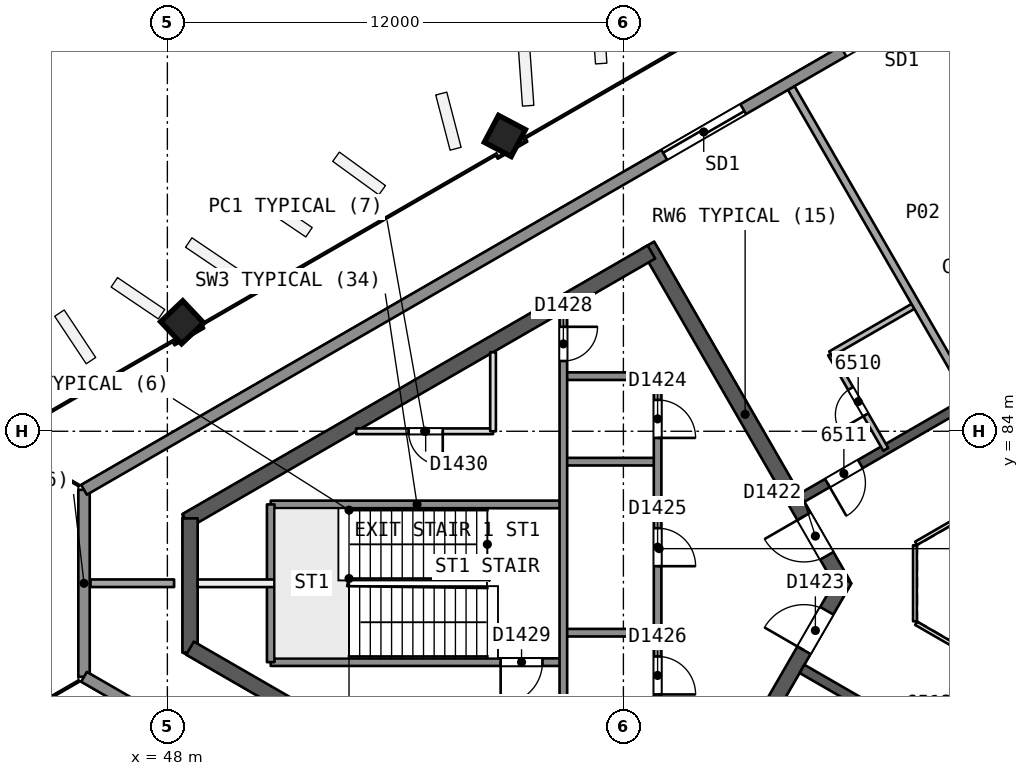
"""IFC4 building model, lengths in metres.
Left out: names, types, materials, properties, quantities, classifications, styles, units other than length and angle.
Written with IfcOpenShell. Run it as: python <this file> out.ifc"""

import sys

from ifc_helpers import new_model, si_unit, direction, frame, frame_2d, origin, origin_2d, place, context, subcontext, project, spatial, rectangle, extrude, element, fill, save


model = new_model("IFC4")
c1 = context("Model", 3, precision=1e-05, world=origin(), true_north=direction((0.0, 1.0)))
c2 = subcontext(c1, "Body", "Model", "MODEL_VIEW")
j1 = project(units=[si_unit("LENGTHUNIT", "METRE"), si_unit("PLANEANGLEUNIT", "RADIAN")], contexts=[c1])
p1 = place(None, origin())
s1 = spatial("IfcSite", under=j1, at=p1, CompositionType="ELEMENT")
p2 = place(p1, origin())
s2 = spatial("IfcBuilding", under=s1, at=p2, CompositionType="ELEMENT")
p3 = place(p2, frame((0.0, 0.0, 266.4)))
s3 = spatial("IfcBuildingStorey", under=s2, at=p3, CompositionType="ELEMENT", Elevation=266.4)
p4 = place(p3, frame((65.769, 80.0, 0.0), z_axis=(0.0, 0.0, 1.0), x_axis=(-0.50000177223, 0.866024380585, 0.0)))
e1 = element("IfcWall", 1, at=p4, inside=s3, PredefinedType="SHEAR", context=c2, shape_type="SweptSolid", body=[
    extrude(rectangle(XDim=10.265, YDim=0.4, at=frame_2d((5.132, 0.0))), origin(), (0.0, 0.0, 1.0), 3.7),
])
p5 = place(p4, frame((0.834, 0.0, 0.0)))
e2 = element("IfcOpeningElement", 2, at=p5, cuts=e1, PredefinedType="OPENING", context=c2, shape_type="SweptSolid", body=[
    extrude(rectangle(XDim=1.2, YDim=2.1, at=frame_2d((0.6, 1.05))), frame((0.0, 0.21, 0.0), z_axis=(0.0, -1.0, 0.0), x_axis=(1.0, 0.0, 0.0)), (0.0, 0.0, 1.0), 0.421),
])
p6 = place(p3, frame((60.737, 88.716, 0.0), z_axis=(0.0, 0.0, 1.0), x_axis=(-0.866028812667, -0.499994095595, 0.0)))
e3 = element("IfcWall", 3, at=p6, inside=s3, PredefinedType="SHEAR", context=c2, shape_type="SweptSolid", body=[
    extrude(rectangle(XDim=14.134, YDim=0.4, at=frame_2d((7.067, 0.0))), origin(), (0.0, 0.0, 1.0), 3.7),
])
p7 = place(p3, frame((48.597, 81.707, 0.0), z_axis=(0.0, 0.0, 1.0), x_axis=(0.0, -1.0, 0.0)))
e4 = element("IfcWall", 4, at=p7, inside=s3, PredefinedType="SHEAR", context=c2, shape_type="SweptSolid", body=[
    extrude(rectangle(XDim=3.53, YDim=0.4, at=frame_2d((1.765, 0.0))), origin(), (0.0, 0.0, 1.0), 3.7),
])
p8 = place(p3, frame((48.597, 78.293, 0.0), z_axis=(0.0, 0.0, 1.0), x_axis=(0.866026024469, -0.499998924941, 0.0)))
e5 = element("IfcWall", 5, at=p8, inside=s3, PredefinedType="SHEAR", context=c2, shape_type="SweptSolid", body=[
    extrude(rectangle(XDim=14.218, YDim=0.4, at=frame_2d((7.109, 0.0))), origin(), (0.0, 0.0, 1.0), 3.7),
])
p9 = place(p3, frame((60.737, 71.284, 0.0), z_axis=(0.0, 0.0, 1.0), x_axis=(0.50000547566, 0.866022242388, 0.0)))
e6 = element("IfcWall", 6, at=p9, inside=s3, PredefinedType="SHEAR", context=c2, shape_type="SweptSolid", body=[
    extrude(rectangle(XDim=10.18, YDim=0.4, at=frame_2d((5.09, 0.0))), origin(), (0.0, 0.0, 1.0), 3.7),
])
p10 = place(p9, frame((8.03, 0.0, 0.0)))
e7 = element("IfcOpeningElement", 7, at=p10, cuts=e6, PredefinedType="OPENING", context=c2, shape_type="SweptSolid", body=[
    extrude(rectangle(XDim=1.2, YDim=2.1, at=frame_2d((0.6, 1.05))), frame((0.0, 0.21, 0.0), z_axis=(0.0, -1.0, 0.0), x_axis=(1.0, 0.0, 0.0)), (0.0, 0.0, 1.0), 0.421),
])
p11 = place(p3, frame((78.2, 90.046, 0.0), z_axis=(0.0, 0.0, 1.0), x_axis=(-0.866026492143, -0.499998114903, 0.0)))
e8 = element("IfcWall", 8, at=p11, inside=s3, PredefinedType="SHEAR", context=c2, shape_type="SweptSolid", body=[
    extrude(rectangle(XDim=15.588, YDim=0.25, at=frame_2d((7.794, 0.0))), origin(), (0.0, 0.0, 1.0), 3.3),
])
p12 = place(p11, frame((7.072, 0.0, 0.0)))
e9 = element("IfcOpeningElement", 9, at=p12, cuts=e8, PredefinedType="OPENING", context=c2, shape_type="SweptSolid", body=[
    extrude(rectangle(XDim=1.0, YDim=2.1, at=frame_2d((0.5, 1.05))), frame((0.0, 0.135, 0.0), z_axis=(0.0, -1.0, 0.0), x_axis=(1.0, 0.0, 0.0)), (0.0, 0.0, 1.0), 0.271),
])
p13 = place(p11, frame((13.816, 0.0, 0.0)))
e10 = element("IfcOpeningElement", 10, at=p13, cuts=e8, PredefinedType="OPENING", context=c2, shape_type="SweptSolid", body=[
    extrude(rectangle(XDim=1.0, YDim=2.1, at=frame_2d((0.5, 1.05))), frame((0.0, 0.135, 0.0), z_axis=(0.0, -1.0, 0.0), x_axis=(1.0, 0.0, 0.0)), (0.0, 0.0, 1.0), 0.271),
])
p14 = place(p3, frame((64.7, 77.748, 0.0), z_axis=(0.0, 0.0, 1.0), x_axis=(0.866026492143, -0.499998114903, 0.0)))
e11 = element("IfcWall", 11, at=p14, inside=s3, PredefinedType="SHEAR", context=c2, shape_type="SweptSolid", body=[
    extrude(rectangle(XDim=15.588, YDim=0.25, at=frame_2d((7.794, 0.0))), origin(), (0.0, 0.0, 1.0), 3.3),
])
p15 = place(p14, frame((3.372, 0.0, 0.0)))
e12 = element("IfcOpeningElement", 12, at=p15, cuts=e11, PredefinedType="OPENING", context=c2, shape_type="SweptSolid", body=[
    extrude(rectangle(XDim=1.0, YDim=2.1, at=frame_2d((0.5, 1.05))), frame((0.0, 0.135, 0.0), z_axis=(0.0, -1.0, 0.0), x_axis=(1.0, 0.0, 0.0)), (0.0, 0.0, 1.0), 0.271),
])
p16 = place(p14, frame((12.216, 0.0, 0.0)))
e13 = element("IfcOpeningElement", 13, at=p16, cuts=e11, PredefinedType="OPENING", context=c2, shape_type="SweptSolid", body=[
    extrude(rectangle(XDim=1.0, YDim=2.1, at=frame_2d((0.5, 1.05))), frame((0.0, 0.135, 0.0), z_axis=(0.0, -1.0, 0.0), x_axis=(1.0, 0.0, 0.0)), (0.0, 0.0, 1.0), 0.271),
])
p17 = place(p3, frame((56.858, 91.785, 0.0), z_axis=(0.019327242333, -0.012137244332, 0.999739538582), x_axis=(-0.500208874039, 0.865669601935, 0.020179757644)))
e14 = element("IfcColumn", 14, at=p17, inside=s3, PredefinedType="COLUMN", context=c2, shape_type="SweptSolid", body=[
    extrude(rectangle(XDim=0.8, YDim=0.8, at=origin_2d()), origin(), (0.0, 0.0, 1.0), 3.701),
])
p18 = place(p3, frame((48.354, 86.876, 0.0), z_axis=(0.028557232129, -0.006793059837, 0.999569076568), x_axis=(-0.500407681469, 0.865554719029, 0.0201787188)))
e15 = element("IfcColumn", 15, at=p18, inside=s3, PredefinedType="COLUMN", context=c2, shape_type="SweptSolid", body=[
    extrude(rectangle(XDim=0.8, YDim=0.8, at=origin_2d()), origin(), (0.0, 0.0, 1.0), 3.702),
])
p19 = place(p3, frame((64.416, 93.032, 0.0), z_axis=(0.0, 0.0, 1.0), x_axis=(0.500006360488, -0.866021731524, 0.0)))
e16 = element("IfcWall", 16, at=p19, inside=s3, PredefinedType="PARTITIONING", context=c2, shape_type="SweptSolid", body=[
    extrude(rectangle(XDim=9.479, YDim=0.2, at=frame_2d((4.739, 0.0))), origin(), (0.0, 0.0, 1.0), 3.3),
])
p20 = place(p3, frame((66.903, 83.524, 0.0), z_axis=(0.0, 0.0, 1.0), x_axis=(-0.499987231761, 0.866032775405, 0.0)))
e17 = element("IfcWall", 17, at=p20, inside=s3, PredefinedType="PARTITIONING", context=c2, shape_type="SweptSolid", body=[
    extrude(rectangle(XDim=2.9, YDim=0.15, at=frame_2d((1.45, 0.0))), origin(), (0.0, 0.0, 1.0), 3.3),
])
p21 = place(p20, frame((1.05, 0.0, 0.0)))
e18 = element("IfcOpeningElement", 18, at=p21, cuts=e17, PredefinedType="OPENING", context=c2, shape_type="SweptSolid", body=[
    extrude(rectangle(XDim=0.8, YDim=2.1, at=frame_2d((0.4, 1.05))), frame((0.0, 0.085, 0.0), z_axis=(0.0, -1.0, 0.0), x_axis=(1.0, 0.0, 0.0)), (0.0, 0.0, 1.0), 0.171),
])
p22 = place(p3, frame((65.453, 86.035, 0.0), z_axis=(0.0, 0.0, 1.0), x_axis=(0.866021400173, 0.500006934395, 0.0)))
e19 = element("IfcWall", 19, at=p22, inside=s3, PredefinedType="PARTITIONING", context=c2, shape_type="SweptSolid", body=[
    extrude(rectangle(XDim=2.6, YDim=0.15, at=frame_2d((1.3, 0.0))), origin(), (0.0, 0.0, 1.0), 3.3),
])
p23 = place(p3, frame((45.977, 80.001, 0.0), z_axis=(0.0, 0.0, 1.0), x_axis=(1.0, 0.0, 0.0)))
e20 = element("IfcWall", 20, at=p23, inside=s3, PredefinedType="PARTITIONING", context=c2, shape_type="SweptSolid", body=[
    extrude(rectangle(XDim=2.2, YDim=0.2, at=frame_2d((1.1, 0.0))), origin(), (0.0, 0.0, 1.0), 3.3),
])
p24 = place(p3, frame((45.807, 77.54, 0.0), z_axis=(0.0, 0.0, 1.0), x_axis=(0.0, 1.0, 0.0)))
e21 = element("IfcWall", 21, at=p24, inside=s3, PredefinedType="SOLIDWALL", context=c2, shape_type="SweptSolid", body=[
    extrude(rectangle(XDim=4.92, YDim=0.3, at=frame_2d((2.46, 0.0))), origin(), (0.0, 0.0, 1.0), 3.3),
])
p25 = place(p3, frame((45.807, 82.46, 0.0), z_axis=(0.0, 0.0, 1.0), x_axis=(0.866024833565, 0.500000987648, 0.0)))
e22 = element("IfcWall", 22, at=p25, inside=s3, PredefinedType="SOLIDWALL", context=c2, shape_type="SweptSolid", body=[
    extrude(rectangle(XDim=48.104, YDim=0.3, at=frame_2d((24.052, 0.0))), origin(), (0.0, 0.0, 1.0), 3.3),
])
p26 = place(p25, frame((28.296, 0.0, 0.0)))
e23 = element("IfcOpeningElement", 23, at=p26, cuts=e22, PredefinedType="OPENING", context=c2, shape_type="SweptSolid", body=[
    extrude(rectangle(XDim=2.4, YDim=2.4, at=frame_2d((1.2, 1.2))), frame((0.0, 0.161, 0.0), z_axis=(0.0, -1.0, 0.0), x_axis=(1.0, 0.0, 0.0)), (0.0, 0.0, 1.0), 0.321),
])
p27 = place(p25, frame((23.074, 0.0, 0.0)))
e24 = element("IfcOpeningElement", 24, at=p27, cuts=e22, PredefinedType="OPENING", context=c2, shape_type="SweptSolid", body=[
    extrude(rectangle(XDim=2.4, YDim=2.4, at=frame_2d((1.2, 1.2))), frame((0.0, 0.161, 0.0), z_axis=(0.0, -1.0, 0.0), x_axis=(1.0, 0.0, 0.0)), (0.0, 0.0, 1.0), 0.321),
])
p28 = place(p25, frame((17.63, 0.0, 0.0)))
e25 = element("IfcOpeningElement", 25, at=p28, cuts=e22, PredefinedType="OPENING", context=c2, shape_type="SweptSolid", body=[
    extrude(rectangle(XDim=2.4, YDim=2.4, at=frame_2d((1.2, 1.2))), frame((0.0, 0.161, 0.0), z_axis=(0.0, -1.0, 0.0), x_axis=(1.0, 0.0, 0.0)), (0.0, 0.0, 1.0), 0.321),
])
p29 = place(p25, frame((39.118, 0.0, 0.9)))
e26 = element("IfcOpeningElement", 26, at=p29, cuts=e22, PredefinedType="OPENING", context=c2, shape_type="SweptSolid", body=[
    extrude(rectangle(XDim=1.8, YDim=1.5, at=frame_2d((0.9, 0.75))), frame((0.0, 0.161, 0.0), z_axis=(0.0, -1.0, 0.0), x_axis=(1.0, 0.0, 0.0)), (0.0, 0.0, 1.0), 0.321),
])
p30 = place(p3, frame((87.466, 53.488, 0.0), z_axis=(0.0, 0.0, 1.0), x_axis=(-0.866024833565, 0.500000987648, 0.0)))
e27 = element("IfcWall", 27, at=p30, inside=s3, PredefinedType="SOLIDWALL", context=c2, shape_type="SweptSolid", body=[
    extrude(rectangle(XDim=48.104, YDim=0.3, at=frame_2d((24.052, 0.0))), origin(), (0.0, 0.0, 1.0), 3.3),
])
p31 = place(p30, frame((23.152, 0.0, 0.0)))
e28 = element("IfcOpeningElement", 28, at=p31, cuts=e27, PredefinedType="OPENING", context=c2, shape_type="SweptSolid", body=[
    extrude(rectangle(XDim=2.4, YDim=2.4, at=frame_2d((1.2, 1.2))), frame((0.0, 0.161, 0.0), z_axis=(0.0, -1.0, 0.0), x_axis=(1.0, 0.0, 0.0)), (0.0, 0.0, 1.0), 0.321),
])
p32 = place(p30, frame((17.93, 0.0, 0.0)))
e29 = element("IfcOpeningElement", 29, at=p32, cuts=e27, PredefinedType="OPENING", context=c2, shape_type="SweptSolid", body=[
    extrude(rectangle(XDim=2.4, YDim=2.4, at=frame_2d((1.2, 1.2))), frame((0.0, 0.161, 0.0), z_axis=(0.0, -1.0, 0.0), x_axis=(1.0, 0.0, 0.0)), (0.0, 0.0, 1.0), 0.321),
])
p33 = place(p30, frame((28.074, 0.0, 0.0)))
e30 = element("IfcOpeningElement", 30, at=p33, cuts=e27, PredefinedType="OPENING", context=c2, shape_type="SweptSolid", body=[
    extrude(rectangle(XDim=2.4, YDim=2.4, at=frame_2d((1.2, 1.2))), frame((0.0, 0.161, 0.0), z_axis=(0.0, -1.0, 0.0), x_axis=(1.0, 0.0, 0.0)), (0.0, 0.0, 1.0), 0.321),
])
p34 = place(p3, frame((60.9, 85.45, 0.0), z_axis=(0.0, 0.0, 1.0), x_axis=(-1.0, 0.0, 0.0)))
e31 = element("IfcWall", 31, at=p34, inside=s3, PredefinedType="SOLIDWALL", context=c2, shape_type="SweptSolid", body=[
    extrude(rectangle(XDim=2.48, YDim=0.2, at=frame_2d((1.24, 0.0))), origin(), (0.0, 0.0, 1.0), 3.3),
])
p35 = place(p3, frame((56.57, 84.0, 0.0), z_axis=(0.0, 0.0, 1.0), x_axis=(-1.0, 0.0, 0.0)))
e32 = element("IfcWall", 32, at=p35, inside=s3, PredefinedType="PARTITIONING", context=c2, shape_type="SweptSolid", body=[
    extrude(rectangle(XDim=3.602, YDim=0.15, at=frame_2d((1.801, 0.0))), origin(), (0.0, 0.0, 1.0), 3.3),
])
p36 = place(p35, frame((1.323, 0.0, 0.0)))
e33 = element("IfcOpeningElement", 33, at=p36, cuts=e32, PredefinedType="OPENING", context=c2, shape_type="SweptSolid", body=[
    extrude(rectangle(XDim=0.9, YDim=2.1, at=frame_2d((0.45, 1.05))), frame((0.0, 0.085, 0.0), z_axis=(0.0, -1.0, 0.0), x_axis=(1.0, 0.0, 0.0)), (0.0, 0.0, 1.0), 0.171),
])
p37 = place(p3, frame((60.9, 83.2, 0.0), z_axis=(0.0, 0.0, 1.0), x_axis=(-1.0, 0.0, 0.0)))
e34 = element("IfcWall", 34, at=p37, inside=s3, PredefinedType="SOLIDWALL", context=c2, shape_type="SweptSolid", body=[
    extrude(rectangle(XDim=2.48, YDim=0.2, at=frame_2d((1.24, 0.0))), origin(), (0.0, 0.0, 1.0), 3.3),
])
p38 = place(p3, frame((58.42, 82.075, 0.0), z_axis=(0.0, 0.0, 1.0), x_axis=(-1.0, 0.0, 0.0)))
e35 = element("IfcWall", 35, at=p38, inside=s3, PredefinedType="SOLIDWALL", context=c2, shape_type="SweptSolid", body=[
    extrude(rectangle(XDim=7.7, YDim=0.2, at=frame_2d((3.85, 0.0))), origin(), (0.0, 0.0, 1.0), 3.3),
])
p39 = place(p3, frame((50.82, 80.0, 0.0), z_axis=(0.0, 0.0, 1.0), x_axis=(-1.0, 0.0, 0.0)))
e36 = element("IfcWall", 36, at=p39, inside=s3, PredefinedType="PARTITIONING", context=c2, shape_type="SweptSolid", body=[
    extrude(rectangle(XDim=2.023, YDim=0.2, at=frame_2d((1.012, 0.0))), origin(), (0.0, 0.0, 1.0), 3.3),
])
p40 = place(p3, frame((60.9, 78.7, 0.0), z_axis=(0.0, 0.0, 1.0), x_axis=(-1.0, 0.0, 0.0)))
e37 = element("IfcWall", 37, at=p40, inside=s3, PredefinedType="SOLIDWALL", context=c2, shape_type="SweptSolid", body=[
    extrude(rectangle(XDim=2.48, YDim=0.2, at=frame_2d((1.24, 0.0))), origin(), (0.0, 0.0, 1.0), 3.3),
])
p41 = place(p3, frame((58.42, 77.925, 0.0), z_axis=(0.0, 0.0, 1.0), x_axis=(-1.0, 0.0, 0.0)))
e38 = element("IfcWall", 38, at=p41, inside=s3, PredefinedType="SOLIDWALL", context=c2, shape_type="SweptSolid", body=[
    extrude(rectangle(XDim=7.7, YDim=0.2, at=frame_2d((3.85, 0.0))), origin(), (0.0, 0.0, 1.0), 3.3),
])
p42 = place(p41, frame((0.55, 0.0, 0.0)))
e39 = element("IfcOpeningElement", 39, at=p42, cuts=e38, PredefinedType="OPENING", context=c2, shape_type="SweptSolid", body=[
    extrude(rectangle(XDim=1.1, YDim=2.1, at=frame_2d((0.55, 1.05))), frame((0.0, 0.11, 0.0), z_axis=(0.0, -1.0, 0.0), x_axis=(1.0, 0.0, 0.0)), (0.0, 0.0, 1.0), 0.221),
])
p43 = place(p3, frame((60.9, 85.45, 0.0), z_axis=(0.0, 0.0, 1.0), x_axis=(0.0, -1.0, 0.0)))
e40 = element("IfcWall", 40, at=p43, inside=s3, PredefinedType="SOLIDWALL", context=c2, shape_type="SweptSolid", body=[
    extrude(rectangle(XDim=10.9, YDim=0.2, at=frame_2d((5.45, 0.0))), origin(), (0.0, 0.0, 1.0), 3.3),
])
p44 = place(p43, frame((0.625, 0.0, 0.0)))
e41 = element("IfcOpeningElement", 41, at=p44, cuts=e40, PredefinedType="OPENING", context=c2, shape_type="SweptSolid", body=[
    extrude(rectangle(XDim=1.0, YDim=2.1, at=frame_2d((0.5, 1.05))), frame((0.0, 0.11, 0.0), z_axis=(0.0, -1.0, 0.0), x_axis=(1.0, 0.0, 0.0)), (0.0, 0.0, 1.0), 0.221),
])
p45 = place(p43, frame((4.0, 0.0, 0.0)))
e42 = element("IfcOpeningElement", 42, at=p45, cuts=e40, PredefinedType="OPENING", context=c2, shape_type="SweptSolid", body=[
    extrude(rectangle(XDim=1.0, YDim=2.1, at=frame_2d((0.5, 1.05))), frame((0.0, 0.11, 0.0), z_axis=(0.0, -1.0, 0.0), x_axis=(1.0, 0.0, 0.0)), (0.0, 0.0, 1.0), 0.221),
])
p46 = place(p43, frame((7.375, 0.0, 0.0)))
e43 = element("IfcOpeningElement", 43, at=p46, cuts=e40, PredefinedType="OPENING", context=c2, shape_type="SweptSolid", body=[
    extrude(rectangle(XDim=1.0, YDim=2.1, at=frame_2d((0.5, 1.05))), frame((0.0, 0.11, 0.0), z_axis=(0.0, -1.0, 0.0), x_axis=(1.0, 0.0, 0.0)), (0.0, 0.0, 1.0), 0.221),
])
p47 = place(p3, frame((58.42, 87.148, 0.0), z_axis=(0.0, 0.0, 1.0), x_axis=(0.0, -1.0, 0.0)))
e44 = element("IfcWall", 44, at=p47, inside=s3, PredefinedType="SOLIDWALL", context=c2, shape_type="SweptSolid", body=[
    extrude(rectangle(XDim=10.698, YDim=0.2, at=frame_2d((5.349, 0.0))), origin(), (0.0, 0.0, 1.0), 3.3),
])
p48 = place(p47, frame((0.399, 0.0, 0.0)))
e45 = element("IfcOpeningElement", 45, at=p48, cuts=e44, PredefinedType="OPENING", context=c2, shape_type="SweptSolid", body=[
    extrude(rectangle(XDim=0.9, YDim=2.1, at=frame_2d((0.45, 1.05))), frame((0.0, 0.11, 0.0), z_axis=(0.0, -1.0, 0.0), x_axis=(1.0, 0.0, 0.0)), (0.0, 0.0, 1.0), 0.221),
])
p49 = place(p3, frame((56.57, 86.08, 0.0), z_axis=(0.0, 0.0, 1.0), x_axis=(0.0, -1.0, 0.0)))
e46 = element("IfcWall", 46, at=p49, inside=s3, PredefinedType="PARTITIONING", context=c2, shape_type="SweptSolid", body=[
    extrude(rectangle(XDim=2.08, YDim=0.15, at=frame_2d((1.04, 0.0))), origin(), (0.0, 0.0, 1.0), 3.3),
])
p50 = place(p3, frame((50.72, 82.075, 0.0), z_axis=(0.0, 0.0, 1.0), x_axis=(0.0, -1.0, 0.0)))
e47 = element("IfcWall", 47, at=p50, inside=s3, PredefinedType="SOLIDWALL", context=c2, shape_type="SweptSolid", body=[
    extrude(rectangle(XDim=4.15, YDim=0.2, at=frame_2d((2.075, 0.0))), origin(), (0.0, 0.0, 1.0), 3.3),
])
p51 = place(p3, frame((77.738, 86.846, 0.0), z_axis=(0.0, 0.0, 1.0), x_axis=(-0.866026658274, -0.499997827154, 0.0)))
e48 = element("IfcWall", 48, at=p51, inside=s3, PredefinedType="PARTITIONING", context=c2, shape_type="SweptSolid", body=[
    extrude(rectangle(XDim=11.588, YDim=0.1, at=frame_2d((5.794, 0.0))), origin(), (0.0, 0.0, 1.0), 3.3),
])
p52 = place(p3, frame((67.672, 81.0, 0.0), z_axis=(0.0, 0.0, 1.0), x_axis=(0.0, -1.0, 0.0)))
e49 = element("IfcWall", 49, at=p52, inside=s3, PredefinedType="PARTITIONING", context=c2, shape_type="SweptSolid", body=[
    extrude(rectangle(XDim=2.0, YDim=0.1, at=frame_2d((1.0, 0.0))), origin(), (0.0, 0.0, 1.0), 3.3),
])
p53 = place(p3, frame((67.702, 78.948, 0.0), z_axis=(0.0, 0.0, 1.0), x_axis=(0.866026658274, -0.499997827154, 0.0)))
e50 = element("IfcWall", 50, at=p53, inside=s3, PredefinedType="PARTITIONING", context=c2, shape_type="SweptSolid", body=[
    extrude(rectangle(XDim=11.588, YDim=0.1, at=frame_2d((5.794, 0.0))), origin(), (0.0, 0.0, 1.0), 3.3),
])
p54 = place(p21, origin())
e51 = element("IfcDoor", 51, at=p54, inside=s3, OperationType="SINGLE_SWING_LEFT", PredefinedType="NOTDEFINED", context=c2, shape_type="SweptSolid", body=[
    extrude(rectangle(XDim=0.8, YDim=2.1, at=frame_2d((0.4, 1.05))), frame((0.0, 0.025, 0.0), z_axis=(0.0, -1.0, 0.0), x_axis=(1.0, 0.0, 0.0)), (0.0, 0.0, 1.0), 0.05),
])
fill(e18, e51)
p55 = place(p13, origin())
e52 = element("IfcDoor", 52, at=p55, inside=s3, OperationType="SINGLE_SWING_RIGHT", PredefinedType="NOTDEFINED", context=c2, shape_type="SweptSolid", body=[
    extrude(rectangle(XDim=1.0, YDim=2.1, at=frame_2d((0.5, 1.05))), frame((0.0, 0.025, 0.0), z_axis=(0.0, -1.0, 0.0), x_axis=(1.0, 0.0, 0.0)), (0.0, 0.0, 1.0), 0.05),
])
fill(e10, e52)
p56 = place(p27, origin())
e53 = element("IfcDoor", 53, at=p56, inside=s3, OperationType="SLIDING_TO_RIGHT", PredefinedType="NOTDEFINED", context=c2, shape_type="SweptSolid", body=[
    extrude(rectangle(XDim=2.4, YDim=2.4, at=frame_2d((1.2, 1.2))), frame((0.0, 0.025, 0.0), z_axis=(0.0, -1.0, 0.0), x_axis=(1.0, 0.0, 0.0)), (0.0, 0.0, 1.0), 0.05),
])
fill(e24, e53)
p57 = place(p28, origin())
e54 = element("IfcDoor", 54, at=p57, inside=s3, OperationType="SLIDING_TO_LEFT", PredefinedType="NOTDEFINED", context=c2, shape_type="SweptSolid", body=[
    extrude(rectangle(XDim=2.4, YDim=2.4, at=frame_2d((1.2, 1.2))), frame((0.0, 0.025, 0.0), z_axis=(0.0, -1.0, 0.0), x_axis=(1.0, 0.0, 0.0)), (0.0, 0.0, 1.0), 0.05),
])
fill(e25, e54)
p58 = place(p5, origin())
e55 = element("IfcDoor", 55, at=p58, inside=s3, OperationType="SINGLE_SWING_RIGHT", PredefinedType="NOTDEFINED", context=c2, shape_type="SweptSolid", body=[
    extrude(rectangle(XDim=1.2, YDim=2.1, at=frame_2d((0.6, 1.05))), frame((0.0, 0.025, 0.0), z_axis=(0.0, -1.0, 0.0), x_axis=(1.0, 0.0, 0.0)), (0.0, 0.0, 1.0), 0.05),
])
fill(e2, e55)
p59 = place(p10, origin())
e56 = element("IfcDoor", 56, at=p59, inside=s3, OperationType="SINGLE_SWING_LEFT", PredefinedType="NOTDEFINED", context=c2, shape_type="SweptSolid", body=[
    extrude(rectangle(XDim=1.2, YDim=2.1, at=frame_2d((0.6, 1.05))), frame((0.0, 0.025, 0.0), z_axis=(0.0, -1.0, 0.0), x_axis=(1.0, 0.0, 0.0)), (0.0, 0.0, 1.0), 0.05),
])
fill(e7, e56)
p60 = place(p44, origin())
e57 = element("IfcDoor", 57, at=p60, inside=s3, OperationType="SINGLE_SWING_RIGHT", PredefinedType="NOTDEFINED", context=c2, shape_type="SweptSolid", body=[
    extrude(rectangle(XDim=1.0, YDim=2.1, at=frame_2d((0.5, 1.05))), frame((0.0, 0.025, 0.0), z_axis=(0.0, -1.0, 0.0), x_axis=(1.0, 0.0, 0.0)), (0.0, 0.0, 1.0), 0.05),
])
fill(e41, e57)
p61 = place(p45, origin())
e58 = element("IfcDoor", 58, at=p61, inside=s3, OperationType="SINGLE_SWING_RIGHT", PredefinedType="NOTDEFINED", context=c2, shape_type="SweptSolid", body=[
    extrude(rectangle(XDim=1.0, YDim=2.1, at=frame_2d((0.5, 1.05))), frame((0.0, 0.025, 0.0), z_axis=(0.0, -1.0, 0.0), x_axis=(1.0, 0.0, 0.0)), (0.0, 0.0, 1.0), 0.05),
])
fill(e42, e58)
p62 = place(p46, origin())
e59 = element("IfcDoor", 59, at=p62, inside=s3, OperationType="SINGLE_SWING_RIGHT", PredefinedType="NOTDEFINED", context=c2, shape_type="SweptSolid", body=[
    extrude(rectangle(XDim=1.0, YDim=2.1, at=frame_2d((0.5, 1.05))), frame((0.0, 0.025, 0.0), z_axis=(0.0, -1.0, 0.0), x_axis=(1.0, 0.0, 0.0)), (0.0, 0.0, 1.0), 0.05),
])
fill(e43, e59)
p63 = place(p48, origin())
e60 = element("IfcDoor", 60, at=p63, inside=s3, OperationType="SINGLE_SWING_LEFT", PredefinedType="NOTDEFINED", context=c2, shape_type="SweptSolid", body=[
    extrude(rectangle(XDim=0.9, YDim=2.1, at=frame_2d((0.45, 1.05))), frame((0.0, 0.025, 0.0), z_axis=(0.0, -1.0, 0.0), x_axis=(1.0, 0.0, 0.0)), (0.0, 0.0, 1.0), 0.05),
])
fill(e45, e60)
p64 = place(p42, origin())
e61 = element("IfcDoor", 61, at=p64, inside=s3, OperationType="SINGLE_SWING_RIGHT", PredefinedType="NOTDEFINED", context=c2, shape_type="SweptSolid", body=[
    extrude(rectangle(XDim=1.1, YDim=2.1, at=frame_2d((0.55, 1.05))), frame((0.0, 0.025, 0.0), z_axis=(0.0, -1.0, 0.0), x_axis=(1.0, 0.0, 0.0)), (0.0, 0.0, 1.0), 0.05),
])
fill(e39, e61)
p65 = place(p36, origin())
e62 = element("IfcDoor", 62, at=p65, inside=s3, OperationType="SINGLE_SWING_LEFT", PredefinedType="NOTDEFINED", context=c2, shape_type="SweptSolid", body=[
    extrude(rectangle(XDim=0.9, YDim=2.1, at=frame_2d((0.45, 1.05))), frame((0.0, 0.025, 0.0), z_axis=(0.0, -1.0, 0.0), x_axis=(1.0, 0.0, 0.0)), (0.0, 0.0, 1.0), 0.05),
])
fill(e33, e62)
save(model, sys.argv[1])
